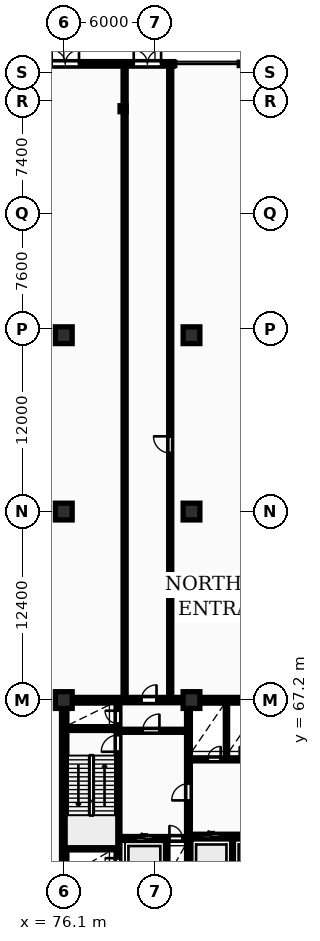
"""IFC4 building model, lengths in metres.
Left out: names, types, materials, properties, quantities, classifications, styles, units other than length and angle.
Written with IfcOpenShell. Run it as: python <this file> out.ifc"""

import sys

from ifc_helpers import new_model, si_unit, direction, frame, frame_2d, origin, origin_2d, place, context, subcontext, project, spatial, rectangle, i_section, extrude, element, fill, save


model = new_model("IFC4")
c1 = context("Model", 3, precision=1e-05, world=origin(), true_north=direction((0.0, 1.0)))
c2 = subcontext(c1, "Body", "Model", "MODEL_VIEW")
j1 = project(units=[si_unit("LENGTHUNIT", "METRE"), si_unit("PLANEANGLEUNIT", "RADIAN")], contexts=[c1])
p1 = place(None, origin())
s1 = spatial("IfcSite", under=j1, at=p1, CompositionType="ELEMENT")
p2 = place(p1, origin())
s2 = spatial("IfcBuilding", under=s1, at=p2, CompositionType="ELEMENT")
p3 = place(p2, origin())
s3 = spatial("IfcBuildingStorey", under=s2, at=p3, CompositionType="ELEMENT", Elevation=0.0)
for number, where, z_axis, x_axis in (
    (1, (76.1, 67.2, 0.0), (0.0, 0.0, 1.0), (1.0, 0.0, 0.0)),
    (2, (76.1, 79.6, 0.0), (0.0, 0.0, 1.0), (1.0, 0.0, 0.0)),
    (3, (76.1, 91.2, 0.0), (0.0, 0.0, 1.0), (1.0, 0.0, 0.0)),
    (4, (84.5, 67.2, 0.0), (0.0, 0.0, 1.0), (1.0, 0.0, 0.0)),
    (5, (84.5, 79.6, 0.0), (0.0, 0.0, 1.0), (1.0, 0.0, 0.0)),
    (6, (84.5, 91.2, 0.0), (0.0, 0.0, 1.0), (1.0, 0.0, 0.0)),
):
    element("IfcColumn", number, at=place(p3, frame(where, z_axis=z_axis, x_axis=x_axis)), inside=s3, PredefinedType="COLUMN", context=c2, shape_type="SweptSolid", body=[
        extrude(rectangle(XDim=1.1, YDim=1.1, at=origin_2d()), origin(), (0.0, 0.0, 1.0), 5.4),
    ])
p4 = place(p3, frame((80.0, 106.1, 0.0), z_axis=(0.0, 0.0, 1.0), x_axis=(1.0, 0.0, 0.0)))
e7 = element("IfcColumn", 7, at=p4, inside=s3, PredefinedType="COLUMN", context=c2, shape_type="SweptSolid", body=[
    extrude(i_section(OverallWidth=0.399, OverallDepth=0.394, WebThickness=0.023, FlangeThickness=0.037, FilletRadius=0.015, at=origin_2d()), origin(), (0.0, 0.0, 1.0), 5.4),
])
p5 = place(p3, frame((83.3, 109.05, 0.0), z_axis=(0.0, 0.0, 1.0), x_axis=(-1.0, 0.0, 0.0)))
e8 = element("IfcWall", 8, at=p5, inside=s3, PredefinedType="STANDARD", context=c2, shape_type="SweptSolid", body=[
    extrude(rectangle(XDim=39.8, YDim=0.3, at=frame_2d((19.9, 0.0))), origin(), (0.0, 0.0, 1.0), 5.1),
])
p6 = place(p5, frame((0.8, 0.0, 0.0)))
e9 = element("IfcOpeningElement", 9, at=p6, cuts=e8, PredefinedType="OPENING", context=c2, shape_type="SweptSolid", body=[
    extrude(rectangle(XDim=1.8, YDim=2.2, at=frame_2d((0.9, 1.1))), frame((0.0, 0.16, 0.0), z_axis=(0.0, -1.0, 0.0), x_axis=(1.0, 0.0, 0.0)), (0.0, 0.0, 1.0), 0.32),
])
p7 = place(p5, frame((6.2, 0.0, 0.0)))
e10 = element("IfcOpeningElement", 10, at=p7, cuts=e8, PredefinedType="OPENING", context=c2, shape_type="SweptSolid", body=[
    extrude(rectangle(XDim=1.8, YDim=2.2, at=frame_2d((0.9, 1.1))), frame((0.0, 0.16, 0.0), z_axis=(0.0, -1.0, 0.0), x_axis=(1.0, 0.0, 0.0)), (0.0, 0.0, 1.0), 0.32),
])
p8 = place(p5, frame((20.0, 0.0, 0.0)))
e11 = element("IfcOpeningElement", 11, at=p8, cuts=e8, PredefinedType="OPENING", context=c2, shape_type="SweptSolid", body=[
    extrude(rectangle(XDim=2.0, YDim=2.6, at=frame_2d((1.0, 1.3))), frame((0.0, 0.16, 0.0), z_axis=(0.0, -1.0, 0.0), x_axis=(1.0, 0.0, 0.0)), (0.0, 0.0, 1.0), 0.32),
])
p9 = place(p3, frame((76.125, 55.375, 0.0), z_axis=(0.0, 0.0, 1.0), x_axis=(0.0, 1.0, 0.0)))
e12 = element("IfcWall", 12, at=p9, inside=s3, PredefinedType="SHEAR", context=c2, shape_type="SweptSolid", body=[
    extrude(rectangle(XDim=11.65, YDim=0.35, at=frame_2d((5.825, 0.0))), origin(), (0.0, 0.0, 1.0), 5.4),
])
p10 = place(p3, frame((75.95, 67.2, 0.0), z_axis=(0.0, 0.0, 1.0), x_axis=(1.0, 0.0, 0.0)))
e13 = element("IfcWall", 13, at=p10, inside=s3, PredefinedType="SHEAR", context=c2, shape_type="SweptSolid", body=[
    extrude(rectangle(XDim=36.3, YDim=0.35, at=frame_2d((18.15, 0.0))), origin(), (0.0, 0.0, 1.0), 5.4),
])
p11 = place(p10, frame((5.25, 0.0, 0.0)))
e14 = element("IfcOpeningElement", 14, at=p11, cuts=e13, PredefinedType="OPENING", context=c2, shape_type="SweptSolid", body=[
    extrude(rectangle(XDim=1.0, YDim=2.15, at=frame_2d((0.5, 1.075))), frame((0.0, 0.185, 0.0), z_axis=(0.0, -1.0, 0.0), x_axis=(1.0, 0.0, 0.0)), (0.0, 0.0, 1.0), 0.37),
])
p12 = place(p10, frame((21.6, 0.0, 0.0)))
e15 = element("IfcOpeningElement", 15, at=p12, cuts=e13, PredefinedType="OPENING", context=c2, shape_type="SweptSolid", body=[
    extrude(rectangle(XDim=1.5, YDim=2.2, at=frame_2d((0.75, 1.1))), frame((0.0, 0.185, 0.0), z_axis=(0.0, -1.0, 0.0), x_axis=(1.0, 0.0, 0.0)), (0.0, 0.0, 1.0), 0.37),
])
p13 = place(p10, frame((30.45, 0.0, 0.0)))
e16 = element("IfcOpeningElement", 16, at=p13, cuts=e13, PredefinedType="OPENING", context=c2, shape_type="SweptSolid", body=[
    extrude(rectangle(XDim=1.0, YDim=2.15, at=frame_2d((0.5, 1.075))), frame((0.0, 0.185, 0.0), z_axis=(0.0, -1.0, 0.0), x_axis=(1.0, 0.0, 0.0)), (0.0, 0.0, 1.0), 0.37),
])
p14 = place(p3, frame((79.665, 55.4, 0.0), z_axis=(0.0, 0.0, 1.0), x_axis=(0.0, 1.0, 0.0)))
e17 = element("IfcWall", 17, at=p14, inside=s3, PredefinedType="SHEAR", context=c2, shape_type="SweptSolid", body=[
    extrude(rectangle(XDim=11.6, YDim=0.25, at=frame_2d((5.8, 0.0))), origin(), (0.0, 0.0, 1.0), 5.4),
])
p15 = place(p14, frame((0.55, 0.0, 0.0)))
e18 = element("IfcOpeningElement", 18, at=p15, cuts=e17, PredefinedType="OPENING", context=c2, shape_type="SweptSolid", body=[
    extrude(rectangle(XDim=0.85, YDim=2.05, at=frame_2d((0.425, 1.025))), frame((0.0, 0.135, 0.0), z_axis=(0.0, -1.0, 0.0), x_axis=(1.0, 0.0, 0.0)), (0.0, 0.0, 1.0), 0.27),
])
p16 = place(p14, frame((8.4, 0.0, 0.0)))
e19 = element("IfcOpeningElement", 19, at=p16, cuts=e17, PredefinedType="OPENING", context=c2, shape_type="SweptSolid", body=[
    extrude(rectangle(XDim=1.1, YDim=2.1, at=frame_2d((0.55, 1.05))), frame((0.0, 0.135, 0.0), z_axis=(0.0, -1.0, 0.0), x_axis=(1.0, 0.0, 0.0)), (0.0, 0.0, 1.0), 0.27),
])
p17 = place(p14, frame((10.25, 0.0, 0.0)))
e20 = element("IfcOpeningElement", 20, at=p17, cuts=e17, PredefinedType="OPENING", context=c2, shape_type="SweptSolid", body=[
    extrude(rectangle(XDim=0.85, YDim=2.05, at=frame_2d((0.425, 1.025))), frame((0.0, 0.135, 0.0), z_axis=(0.0, -1.0, 0.0), x_axis=(1.0, 0.0, 0.0)), (0.0, 0.0, 1.0), 0.27),
])
for number, where, z_axis, x_axis in (
    (21, (76.3, 57.475, 0.0), (0.0, 0.0, 1.0), (1.0, 0.0, 0.0)),
    (22, (76.3, 65.325, 0.0), (0.0, 0.0, 1.0), (1.0, 0.0, 0.0)),
):
    element("IfcWall", number, at=place(p3, frame(where, z_axis=z_axis, x_axis=x_axis)), inside=s3, PredefinedType="SHEAR", context=c2, shape_type="SweptSolid", body=[
        extrude(rectangle(XDim=3.24, YDim=0.25, at=frame_2d((1.62, 0.0))), origin(), (0.0, 0.0, 1.0), 5.4),
    ])
p18 = place(p3, frame((79.79, 58.1, 0.0), z_axis=(0.0, 0.0, 1.0), x_axis=(1.0, 0.0, 0.0)))
e23 = element("IfcWall", 23, at=p18, inside=s3, PredefinedType="SHEAR", context=c2, shape_type="SweptSolid", body=[
    extrude(rectangle(XDim=4.39, YDim=0.25, at=frame_2d((2.195, 0.0))), origin(), (0.0, 0.0, 1.0), 5.4),
])
p19 = place(p18, frame((1.05, 0.0, 0.0)))
e24 = element("IfcOpeningElement", 24, at=p19, cuts=e23, PredefinedType="OPENING", context=c2, shape_type="SweptSolid", body=[
    extrude(rectangle(XDim=1.12, YDim=2.12, at=frame_2d((0.56, 1.06))), frame((0.0, 0.135, 0.0), z_axis=(0.0, -1.0, 0.0), x_axis=(1.0, 0.0, 0.0)), (0.0, 0.0, 1.0), 0.27),
])
p20 = place(p18, frame((3.26, 0.0, 0.0)))
e25 = element("IfcOpeningElement", 25, at=p20, cuts=e23, PredefinedType="OPENING", context=c2, shape_type="SweptSolid", body=[
    extrude(rectangle(XDim=0.85, YDim=2.05, at=frame_2d((0.425, 1.025))), frame((0.0, 0.135, 0.0), z_axis=(0.0, -1.0, 0.0), x_axis=(1.0, 0.0, 0.0)), (0.0, 0.0, 1.0), 0.27),
])
p21 = place(p3, frame((82.85, 55.4, 0.0), z_axis=(0.0, 0.0, 1.0), x_axis=(0.0, 1.0, 0.0)))
e26 = element("IfcWall", 26, at=p21, inside=s3, PredefinedType="PARTITIONING", context=c2, shape_type="SweptSolid", body=[
    extrude(rectangle(XDim=2.56, YDim=0.2, at=frame_2d((1.28, 0.0))), origin(), (0.0, 0.0, 1.0), 5.1),
])
p22 = place(p3, frame((79.79, 65.18, 0.0), z_axis=(0.0, 0.0, 1.0), x_axis=(1.0, 0.0, 0.0)))
e27 = element("IfcWall", 27, at=p22, inside=s3, PredefinedType="PARTITIONING", context=c2, shape_type="SweptSolid", body=[
    extrude(rectangle(XDim=4.39, YDim=0.2, at=frame_2d((2.195, 0.0))), origin(), (0.0, 0.0, 1.0), 5.1),
])
p23 = place(p22, frame((1.5, 0.0, 0.0)))
e28 = element("IfcOpeningElement", 28, at=p23, cuts=e27, PredefinedType="OPENING", context=c2, shape_type="SweptSolid", body=[
    extrude(rectangle(XDim=1.1, YDim=2.1, at=frame_2d((0.55, 1.05))), frame((0.0, 0.11, 0.0), z_axis=(0.0, -1.0, 0.0), x_axis=(1.0, 0.0, 0.0)), (0.0, 0.0, 1.0), 0.22),
])
p24 = place(p3, frame((84.3, 55.4, 0.0), z_axis=(0.0, 0.0, 1.0), x_axis=(0.0, 1.0, 0.0)))
e29 = element("IfcWall", 29, at=p24, inside=s3, PredefinedType="SHEAR", context=c2, shape_type="SweptSolid", body=[
    extrude(rectangle(XDim=11.6, YDim=0.25, at=frame_2d((5.8, 0.0))), origin(), (0.0, 0.0, 1.0), 5.4),
])
p25 = place(p24, frame((5.2, 0.0, 0.0)))
e30 = element("IfcOpeningElement", 30, at=p25, cuts=e29, PredefinedType="OPENING", context=c2, shape_type="SweptSolid", body=[
    extrude(rectangle(XDim=1.1, YDim=2.1, at=frame_2d((0.55, 1.05))), frame((0.0, 0.135, 0.0), z_axis=(0.0, -1.0, 0.0), x_axis=(1.0, 0.0, 0.0)), (0.0, 0.0, 1.0), 0.27),
])
p26 = place(p3, frame((87.2, 55.4, 0.0), z_axis=(0.0, 0.0, 1.0), x_axis=(0.0, 1.0, 0.0)))
e31 = element("IfcWall", 31, at=p26, inside=s3, PredefinedType="PARTITIONING", context=c2, shape_type="SweptSolid", body=[
    extrude(rectangle(XDim=2.72, YDim=0.2, at=frame_2d((1.36, 0.0))), origin(), (0.0, 0.0, 1.0), 5.1),
])
p27 = place(p3, frame((84.42, 58.25, 0.0), z_axis=(0.0, 0.0, 1.0), x_axis=(1.0, 0.0, 0.0)))
e32 = element("IfcWall", 32, at=p27, inside=s3, PredefinedType="SHEAR", context=c2, shape_type="SweptSolid", body=[
    extrude(rectangle(XDim=8.36, YDim=0.25, at=frame_2d((4.18, 0.0))), origin(), (0.0, 0.0, 1.0), 5.4),
])
p28 = place(p27, frame((0.82, 0.0, 0.0)))
e33 = element("IfcOpeningElement", 33, at=p28, cuts=e32, PredefinedType="OPENING", context=c2, shape_type="SweptSolid", body=[
    extrude(rectangle(XDim=1.12, YDim=2.12, at=frame_2d((0.56, 1.06))), frame((0.0, 0.135, 0.0), z_axis=(0.0, -1.0, 0.0), x_axis=(1.0, 0.0, 0.0)), (0.0, 0.0, 1.0), 0.27),
])
p29 = place(p27, frame((3.62, 0.0, 0.0)))
e34 = element("IfcOpeningElement", 34, at=p29, cuts=e32, PredefinedType="OPENING", context=c2, shape_type="SweptSolid", body=[
    extrude(rectangle(XDim=1.12, YDim=2.12, at=frame_2d((0.56, 1.06))), frame((0.0, 0.135, 0.0), z_axis=(0.0, -1.0, 0.0), x_axis=(1.0, 0.0, 0.0)), (0.0, 0.0, 1.0), 0.27),
])
p30 = place(p27, frame((6.42, 0.0, 0.0)))
e35 = element("IfcOpeningElement", 35, at=p30, cuts=e32, PredefinedType="OPENING", context=c2, shape_type="SweptSolid", body=[
    extrude(rectangle(XDim=1.12, YDim=2.12, at=frame_2d((0.56, 1.06))), frame((0.0, 0.135, 0.0), z_axis=(0.0, -1.0, 0.0), x_axis=(1.0, 0.0, 0.0)), (0.0, 0.0, 1.0), 0.27),
])
p31 = place(p3, frame((86.8, 63.4, 0.0), z_axis=(0.0, 0.0, 1.0), x_axis=(0.0, 1.0, 0.0)))
e36 = element("IfcWall", 36, at=p31, inside=s3, PredefinedType="PARTITIONING", context=c2, shape_type="SweptSolid", body=[
    extrude(rectangle(XDim=3.6, YDim=0.15, at=frame_2d((1.8, 0.0))), origin(), (0.0, 0.0, 1.0), 5.1),
])
p32 = place(p3, frame((84.42, 63.3, 0.0), z_axis=(0.0, 0.0, 1.0), x_axis=(1.0, 0.0, 0.0)))
e37 = element("IfcWall", 37, at=p32, inside=s3, PredefinedType="PARTITIONING", context=c2, shape_type="SweptSolid", body=[
    extrude(rectangle(XDim=19.83, YDim=0.2, at=frame_2d((9.915, 0.0))), origin(), (0.0, 0.0, 1.0), 5.1),
])
p33 = place(p32, frame((1.15, 0.0, 0.0)))
e38 = element("IfcOpeningElement", 38, at=p33, cuts=e37, PredefinedType="OPENING", context=c2, shape_type="SweptSolid", body=[
    extrude(rectangle(XDim=0.85, YDim=2.05, at=frame_2d((0.425, 1.025))), frame((0.0, 0.11, 0.0), z_axis=(0.0, -1.0, 0.0), x_axis=(1.0, 0.0, 0.0)), (0.0, 0.0, 1.0), 0.22),
])
p34 = place(p32, frame((3.25, 0.0, 0.0)))
e39 = element("IfcOpeningElement", 39, at=p34, cuts=e37, PredefinedType="OPENING", context=c2, shape_type="SweptSolid", body=[
    extrude(rectangle(XDim=0.85, YDim=2.05, at=frame_2d((0.425, 1.025))), frame((0.0, 0.11, 0.0), z_axis=(0.0, -1.0, 0.0), x_axis=(1.0, 0.0, 0.0)), (0.0, 0.0, 1.0), 0.22),
])
p35 = place(p32, frame((13.08, 0.0, 0.0)))
e40 = element("IfcOpeningElement", 40, at=p35, cuts=e37, PredefinedType="OPENING", context=c2, shape_type="SweptSolid", body=[
    extrude(rectangle(XDim=1.5, YDim=2.2, at=frame_2d((0.75, 1.1))), frame((0.0, 0.11, 0.0), z_axis=(0.0, -1.0, 0.0), x_axis=(1.0, 0.0, 0.0)), (0.0, 0.0, 1.0), 0.22),
])
p36 = place(p32, frame((6.78, 0.0, 0.0)))
e41 = element("IfcOpeningElement", 41, at=p36, cuts=e37, PredefinedType="OPENING", context=c2, shape_type="SweptSolid", body=[
    extrude(rectangle(XDim=0.92, YDim=2.08, at=frame_2d((0.46, 1.04))), frame((0.0, 0.11, 0.0), z_axis=(0.0, -1.0, 0.0), x_axis=(1.0, 0.0, 0.0)), (0.0, 0.0, 1.0), 0.22),
])
p37 = place(p32, frame((16.28, 0.0, 0.0)))
e42 = element("IfcOpeningElement", 42, at=p37, cuts=e37, PredefinedType="OPENING", context=c2, shape_type="SweptSolid", body=[
    extrude(rectangle(XDim=0.92, YDim=2.08, at=frame_2d((0.46, 1.04))), frame((0.0, 0.11, 0.0), z_axis=(0.0, -1.0, 0.0), x_axis=(1.0, 0.0, 0.0)), (0.0, 0.0, 1.0), 0.22),
])
p38 = place(p3, frame((80.1, 67.45, 0.0), z_axis=(0.0, 0.0, 1.0), x_axis=(0.0, 1.0, 0.0)))
e43 = element("IfcWall", 43, at=p38, inside=s3, PredefinedType="PARTITIONING", context=c2, shape_type="SweptSolid", body=[
    extrude(rectangle(XDim=41.45, YDim=0.2, at=frame_2d((20.725, 0.0))), origin(), (0.0, 0.0, 1.0), 5.1),
])
p39 = place(p3, frame((83.1, 67.45, 0.0), z_axis=(0.0, 0.0, 1.0), x_axis=(0.0, 1.0, 0.0)))
e44 = element("IfcWall", 44, at=p39, inside=s3, PredefinedType="PARTITIONING", context=c2, shape_type="SweptSolid", body=[
    extrude(rectangle(XDim=41.45, YDim=0.2, at=frame_2d((20.725, 0.0))), origin(), (0.0, 0.0, 1.0), 5.1),
])
p40 = place(p39, frame((16.0, 0.0, 0.0)))
e45 = element("IfcOpeningElement", 45, at=p40, cuts=e44, PredefinedType="OPENING", context=c2, shape_type="SweptSolid", body=[
    extrude(rectangle(XDim=1.1, YDim=2.1, at=frame_2d((0.55, 1.05))), frame((0.0, 0.11, 0.0), z_axis=(0.0, -1.0, 0.0), x_axis=(1.0, 0.0, 0.0)), (0.0, 0.0, 1.0), 0.22),
])
p41 = place(p6, frame((1.8, 0.0, 0.0), z_axis=(0.0, 0.0, 1.0), x_axis=(-1.0, 0.0, 0.0)))
e46 = element("IfcDoor", 46, at=p41, inside=s3, OperationType="DOUBLE_DOOR_SINGLE_SWING", PredefinedType="DOOR", context=c2, shape_type="SweptSolid", body=[
    extrude(rectangle(XDim=1.8, YDim=2.2, at=frame_2d((0.9, 1.1))), frame((0.0, 0.025, 0.0), z_axis=(0.0, -1.0, 0.0), x_axis=(1.0, 0.0, 0.0)), (0.0, 0.0, 1.0), 0.05),
])
fill(e9, e46)
p42 = place(p7, frame((1.8, 0.0, 0.0), z_axis=(0.0, 0.0, 1.0), x_axis=(-1.0, 0.0, 0.0)))
e47 = element("IfcDoor", 47, at=p42, inside=s3, OperationType="DOUBLE_DOOR_SINGLE_SWING", PredefinedType="DOOR", context=c2, shape_type="SweptSolid", body=[
    extrude(rectangle(XDim=1.8, YDim=2.2, at=frame_2d((0.9, 1.1))), frame((0.0, 0.025, 0.0), z_axis=(0.0, -1.0, 0.0), x_axis=(1.0, 0.0, 0.0)), (0.0, 0.0, 1.0), 0.05),
])
fill(e10, e47)
p43 = place(p11, origin())
e48 = element("IfcDoor", 48, at=p43, inside=s3, OperationType="SINGLE_SWING_RIGHT", PredefinedType="DOOR", context=c2, shape_type="SweptSolid", body=[
    extrude(rectangle(XDim=1.0, YDim=2.15, at=frame_2d((0.5, 1.075))), frame((0.0, 0.025, 0.0), z_axis=(0.0, -1.0, 0.0), x_axis=(1.0, 0.0, 0.0)), (0.0, 0.0, 1.0), 0.05),
])
fill(e14, e48)
p44 = place(p15, origin())
e49 = element("IfcDoor", 49, at=p44, inside=s3, OperationType="SINGLE_SWING_RIGHT", PredefinedType="DOOR", context=c2, shape_type="SweptSolid", body=[
    extrude(rectangle(XDim=0.85, YDim=2.05, at=frame_2d((0.425, 1.025))), frame((0.0, 0.025, 0.0), z_axis=(0.0, -1.0, 0.0), x_axis=(1.0, 0.0, 0.0)), (0.0, 0.0, 1.0), 0.05),
])
fill(e18, e49)
p45 = place(p16, origin())
e50 = element("IfcDoor", 50, at=p45, inside=s3, OperationType="SINGLE_SWING_LEFT", PredefinedType="DOOR", context=c2, shape_type="SweptSolid", body=[
    extrude(rectangle(XDim=1.1, YDim=2.1, at=frame_2d((0.55, 1.05))), frame((0.0, 0.025, 0.0), z_axis=(0.0, -1.0, 0.0), x_axis=(1.0, 0.0, 0.0)), (0.0, 0.0, 1.0), 0.05),
])
fill(e19, e50)
p46 = place(p17, origin())
e51 = element("IfcDoor", 51, at=p46, inside=s3, OperationType="SINGLE_SWING_RIGHT", PredefinedType="DOOR", context=c2, shape_type="SweptSolid", body=[
    extrude(rectangle(XDim=0.85, YDim=2.05, at=frame_2d((0.425, 1.025))), frame((0.0, 0.025, 0.0), z_axis=(0.0, -1.0, 0.0), x_axis=(1.0, 0.0, 0.0)), (0.0, 0.0, 1.0), 0.05),
])
fill(e20, e51)
p47 = place(p19, origin())
e52 = element("IfcDoor", 52, at=p47, inside=s3, OperationType="SLIDING_TO_LEFT", PredefinedType="DOOR", context=c2, shape_type="SweptSolid", body=[
    extrude(rectangle(XDim=1.12, YDim=2.12, at=frame_2d((0.56, 1.06))), frame((0.0, 0.025, 0.0), z_axis=(0.0, -1.0, 0.0), x_axis=(1.0, 0.0, 0.0)), (0.0, 0.0, 1.0), 0.05),
])
fill(e24, e52)
p48 = place(p20, origin())
e53 = element("IfcDoor", 53, at=p48, inside=s3, OperationType="SINGLE_SWING_LEFT", PredefinedType="DOOR", context=c2, shape_type="SweptSolid", body=[
    extrude(rectangle(XDim=0.85, YDim=2.05, at=frame_2d((0.425, 1.025))), frame((0.0, 0.025, 0.0), z_axis=(0.0, -1.0, 0.0), x_axis=(1.0, 0.0, 0.0)), (0.0, 0.0, 1.0), 0.05),
])
fill(e25, e53)
p49 = place(p23, origin())
e54 = element("IfcDoor", 54, at=p49, inside=s3, OperationType="SINGLE_SWING_RIGHT", PredefinedType="DOOR", context=c2, shape_type="SweptSolid", body=[
    extrude(rectangle(XDim=1.1, YDim=2.1, at=frame_2d((0.55, 1.05))), frame((0.0, 0.025, 0.0), z_axis=(0.0, -1.0, 0.0), x_axis=(1.0, 0.0, 0.0)), (0.0, 0.0, 1.0), 0.05),
])
fill(e28, e54)
p50 = place(p25, origin())
e55 = element("IfcDoor", 55, at=p50, inside=s3, OperationType="SINGLE_SWING_LEFT", PredefinedType="DOOR", context=c2, shape_type="SweptSolid", body=[
    extrude(rectangle(XDim=1.1, YDim=2.1, at=frame_2d((0.55, 1.05))), frame((0.0, 0.025, 0.0), z_axis=(0.0, -1.0, 0.0), x_axis=(1.0, 0.0, 0.0)), (0.0, 0.0, 1.0), 0.05),
])
fill(e30, e55)
p51 = place(p28, origin())
e56 = element("IfcDoor", 56, at=p51, inside=s3, OperationType="SLIDING_TO_LEFT", PredefinedType="DOOR", context=c2, shape_type="SweptSolid", body=[
    extrude(rectangle(XDim=1.12, YDim=2.12, at=frame_2d((0.56, 1.06))), frame((0.0, 0.025, 0.0), z_axis=(0.0, -1.0, 0.0), x_axis=(1.0, 0.0, 0.0)), (0.0, 0.0, 1.0), 0.05),
])
fill(e33, e56)
p52 = place(p33, origin())
e57 = element("IfcDoor", 57, at=p52, inside=s3, OperationType="SINGLE_SWING_RIGHT", PredefinedType="DOOR", context=c2, shape_type="SweptSolid", body=[
    extrude(rectangle(XDim=0.85, YDim=2.05, at=frame_2d((0.425, 1.025))), frame((0.0, 0.025, 0.0), z_axis=(0.0, -1.0, 0.0), x_axis=(1.0, 0.0, 0.0)), (0.0, 0.0, 1.0), 0.05),
])
fill(e38, e57)
p53 = place(p34, origin())
e58 = element("IfcDoor", 58, at=p53, inside=s3, OperationType="SINGLE_SWING_LEFT", PredefinedType="DOOR", context=c2, shape_type="SweptSolid", body=[
    extrude(rectangle(XDim=0.85, YDim=2.05, at=frame_2d((0.425, 1.025))), frame((0.0, 0.025, 0.0), z_axis=(0.0, -1.0, 0.0), x_axis=(1.0, 0.0, 0.0)), (0.0, 0.0, 1.0), 0.05),
])
fill(e39, e58)
p54 = place(p40, origin())
e59 = element("IfcDoor", 59, at=p54, inside=s3, OperationType="SINGLE_SWING_RIGHT", PredefinedType="DOOR", context=c2, shape_type="SweptSolid", body=[
    extrude(rectangle(XDim=1.1, YDim=2.1, at=frame_2d((0.55, 1.05))), frame((0.0, 0.025, 0.0), z_axis=(0.0, -1.0, 0.0), x_axis=(1.0, 0.0, 0.0)), (0.0, 0.0, 1.0), 0.05),
])
fill(e45, e59)
save(model, sys.argv[1])
